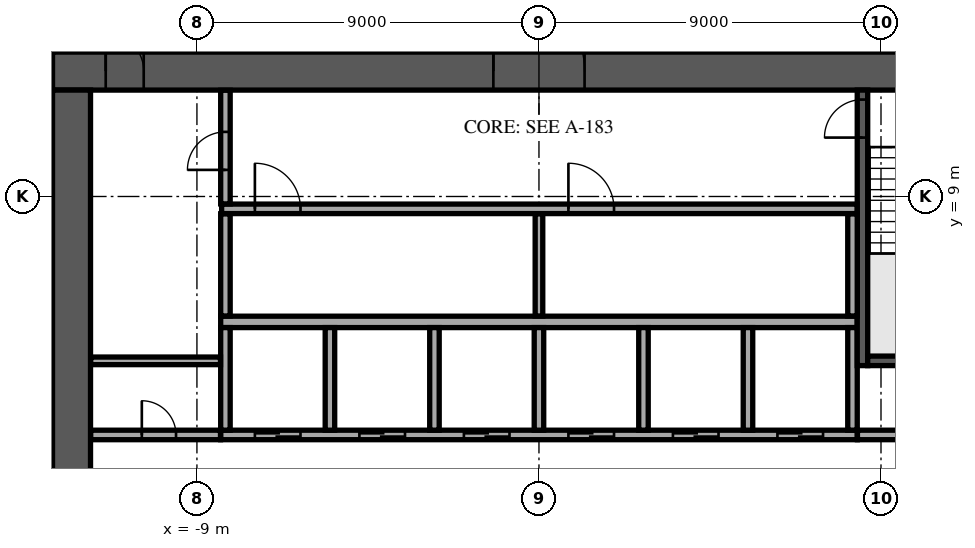
"""IFC4 building model, lengths in metres.
Left out: names, types, materials, properties, quantities, classifications, styles, units other than length and angle.
Written with IfcOpenShell. Run it as: python <this file> out.ifc"""

import sys

from ifc_helpers import new_model, si_unit, direction, frame, frame_2d, origin, place, context, subcontext, project, spatial, rectangle, extrude, element, fill, save


model = new_model("IFC4")
c1 = context("Model", 3, precision=1e-05, world=origin(), true_north=direction((0.0, 1.0)))
c2 = subcontext(c1, "Body", "Model", "MODEL_VIEW")
j1 = project(units=[si_unit("LENGTHUNIT", "METRE"), si_unit("PLANEANGLEUNIT", "RADIAN")], contexts=[c1])
p1 = place(None, origin())
s1 = spatial("IfcSite", under=j1, at=p1, CompositionType="ELEMENT")
p2 = place(p1, origin())
s2 = spatial("IfcBuilding", under=s1, at=p2, CompositionType="ELEMENT")
p3 = place(p2, frame((0.0, 0.0, 147.7)))
s3 = spatial("IfcBuildingStorey", under=s2, at=p3, CompositionType="ELEMENT", Elevation=147.7)
p4 = place(p3, frame((-12.8, 12.3, 0.0), z_axis=(0.0, 0.0, 1.0), x_axis=(1.0, 0.0, 0.0)))
e1 = element("IfcWall", 1, at=p4, inside=s3, PredefinedType="SHEAR", context=c2, shape_type="SweptSolid", body=[
    extrude(rectangle(XDim=25.6, YDim=1.0, at=frame_2d((12.8, 0.0))), origin(), (0.0, 0.0, 1.0), 3.6),
])
p5 = place(p4, frame((11.6, 0.0, 0.0)))
e2 = element("IfcOpeningElement", 2, at=p5, cuts=e1, PredefinedType="OPENING", context=c2, shape_type="SweptSolid", body=[
    extrude(rectangle(XDim=2.4, YDim=2.4, at=frame_2d((1.2, 1.2))), frame((0.0, 0.51, 0.0), z_axis=(0.0, -1.0, 0.0), x_axis=(1.0, 0.0, 0.0)), (0.0, 0.0, 1.0), 1.02),
])
p6 = place(p4, frame((22.425, 0.0, 0.0)))
e3 = element("IfcOpeningElement", 3, at=p6, cuts=e1, PredefinedType="OPENING", context=c2, shape_type="SweptSolid", body=[
    extrude(rectangle(XDim=1.2, YDim=2.1, at=frame_2d((0.6, 1.05))), frame((0.0, 0.51, 0.0), z_axis=(0.0, -1.0, 0.0), x_axis=(1.0, 0.0, 0.0)), (0.0, 0.0, 1.0), 1.02),
])
p7 = place(p4, frame((1.4, 0.0, 0.0)))
e4 = element("IfcOpeningElement", 4, at=p7, cuts=e1, PredefinedType="OPENING", context=c2, shape_type="SweptSolid", body=[
    extrude(rectangle(XDim=1.0, YDim=2.1, at=frame_2d((0.5, 1.05))), frame((0.0, 0.51, 0.0), z_axis=(0.0, -1.0, 0.0), x_axis=(1.0, 0.0, 0.0)), (0.0, 0.0, 1.0), 1.02),
])
p8 = place(p3, frame((-12.3, -11.8, 0.0), z_axis=(0.0, 0.0, 1.0), x_axis=(0.0, 1.0, 0.0)))
e5 = element("IfcWall", 5, at=p8, inside=s3, PredefinedType="SHEAR", context=c2, shape_type="SweptSolid", body=[
    extrude(rectangle(XDim=23.6, YDim=1.0, at=frame_2d((11.8, 0.0))), origin(), (0.0, 0.0, 1.0), 3.6),
])
p9 = place(p8, frame((10.6, 0.0, 0.0)))
e6 = element("IfcOpeningElement", 6, at=p9, cuts=e5, PredefinedType="OPENING", context=c2, shape_type="SweptSolid", body=[
    extrude(rectangle(XDim=2.4, YDim=2.4, at=frame_2d((1.2, 1.2))), frame((0.0, 0.51, 0.0), z_axis=(0.0, -1.0, 0.0), x_axis=(1.0, 0.0, 0.0)), (0.0, 0.0, 1.0), 1.02),
])
p10 = place(p3, frame((-8.375, 5.7, 0.0), z_axis=(0.0, 0.0, 1.0), x_axis=(1.0, 0.0, 0.0)))
e7 = element("IfcWall", 7, at=p10, inside=s3, PredefinedType="SOLIDWALL", context=c2, shape_type="SweptSolid", body=[
    extrude(rectangle(XDim=16.75, YDim=0.3, at=frame_2d((8.375, 0.0))), origin(), (0.0, 0.0, 1.0), 3.6),
])
p11 = place(p3, frame((-8.375, 2.725, 0.0), z_axis=(0.0, 0.0, 1.0), x_axis=(1.0, 0.0, 0.0)))
e8 = element("IfcWall", 8, at=p11, inside=s3, PredefinedType="SOLIDWALL", context=c2, shape_type="SweptSolid", body=[
    extrude(rectangle(XDim=16.75, YDim=0.25, at=frame_2d((8.375, 0.0))), origin(), (0.0, 0.0, 1.0), 3.6),
])
p12 = place(p11, frame((0.9, 0.0, 0.0)))
e9 = element("IfcOpeningElement", 9, at=p12, cuts=e8, PredefinedType="OPENING", context=c2, shape_type="SweptSolid", body=[
    extrude(rectangle(XDim=1.2, YDim=2.1, at=frame_2d((0.6, 1.05))), frame((0.0, 0.135, 0.0), z_axis=(0.0, -1.0, 0.0), x_axis=(1.0, 0.0, 0.0)), (0.0, 0.0, 1.0), 0.27),
])
p13 = place(p11, frame((3.65, 0.0, 0.0)))
e10 = element("IfcOpeningElement", 10, at=p13, cuts=e8, PredefinedType="OPENING", context=c2, shape_type="SweptSolid", body=[
    extrude(rectangle(XDim=1.2, YDim=2.1, at=frame_2d((0.6, 1.05))), frame((0.0, 0.135, 0.0), z_axis=(0.0, -1.0, 0.0), x_axis=(1.0, 0.0, 0.0)), (0.0, 0.0, 1.0), 0.27),
])
p14 = place(p11, frame((6.4, 0.0, 0.0)))
e11 = element("IfcOpeningElement", 11, at=p14, cuts=e8, PredefinedType="OPENING", context=c2, shape_type="SweptSolid", body=[
    extrude(rectangle(XDim=1.2, YDim=2.1, at=frame_2d((0.6, 1.05))), frame((0.0, 0.135, 0.0), z_axis=(0.0, -1.0, 0.0), x_axis=(1.0, 0.0, 0.0)), (0.0, 0.0, 1.0), 0.27),
])
p15 = place(p11, frame((9.15, 0.0, 0.0)))
e12 = element("IfcOpeningElement", 12, at=p15, cuts=e8, PredefinedType="OPENING", context=c2, shape_type="SweptSolid", body=[
    extrude(rectangle(XDim=1.2, YDim=2.1, at=frame_2d((0.6, 1.05))), frame((0.0, 0.135, 0.0), z_axis=(0.0, -1.0, 0.0), x_axis=(1.0, 0.0, 0.0)), (0.0, 0.0, 1.0), 0.27),
])
p16 = place(p11, frame((11.9, 0.0, 0.0)))
e13 = element("IfcOpeningElement", 13, at=p16, cuts=e8, PredefinedType="OPENING", context=c2, shape_type="SweptSolid", body=[
    extrude(rectangle(XDim=1.2, YDim=2.1, at=frame_2d((0.6, 1.05))), frame((0.0, 0.135, 0.0), z_axis=(0.0, -1.0, 0.0), x_axis=(1.0, 0.0, 0.0)), (0.0, 0.0, 1.0), 0.27),
])
p17 = place(p11, frame((14.65, 0.0, 0.0)))
e14 = element("IfcOpeningElement", 14, at=p17, cuts=e8, PredefinedType="OPENING", context=c2, shape_type="SweptSolid", body=[
    extrude(rectangle(XDim=1.2, YDim=2.1, at=frame_2d((0.6, 1.05))), frame((0.0, 0.135, 0.0), z_axis=(0.0, -1.0, 0.0), x_axis=(1.0, 0.0, 0.0)), (0.0, 0.0, 1.0), 0.27),
])
for number, where, z_axis, x_axis in (
    (15, (-8.25, 2.85, 0.0), (0.0, 0.0, 1.0), (0.0, 1.0, 0.0)),
    (16, (-5.5, 2.85, 0.0), (0.0, 0.0, 1.0), (0.0, 1.0, 0.0)),
    (17, (-2.75, 2.85, 0.0), (0.0, 0.0, 1.0), (0.0, 1.0, 0.0)),
    (18, (0.0, 2.85, 0.0), (0.0, 0.0, 1.0), (0.0, 1.0, 0.0)),
    (19, (2.75, 2.85, 0.0), (0.0, 0.0, 1.0), (0.0, 1.0, 0.0)),
    (20, (5.5, 2.85, 0.0), (0.0, 0.0, 1.0), (0.0, 1.0, 0.0)),
    (21, (8.25, 2.85, 0.0), (0.0, 0.0, 1.0), (0.0, 1.0, 0.0)),
):
    element("IfcWall", number, at=place(p3, frame(where, z_axis=z_axis, x_axis=x_axis)), inside=s3, PredefinedType="SOLIDWALL", context=c2, shape_type="SweptSolid", body=[
        extrude(rectangle(XDim=2.7, YDim=0.25, at=frame_2d((1.35, 0.0))), origin(), (0.0, 0.0, 1.0), 3.6),
    ])
p18 = place(p3, frame((8.512, 4.55, 0.0), z_axis=(0.0, 0.0, 1.0), x_axis=(0.0, 1.0, 0.0)))
e22 = element("IfcWall", 22, at=p18, inside=s3, PredefinedType="SOLIDWALL", context=c2, shape_type="SweptSolid", body=[
    extrude(rectangle(XDim=7.25, YDim=0.275, at=frame_2d((3.625, 0.0))), origin(), (0.0, 0.0, 1.0), 3.6),
])
p19 = place(p18, frame((6.0, 0.0, 0.0)))
e23 = element("IfcOpeningElement", 23, at=p19, cuts=e22, PredefinedType="OPENING", context=c2, shape_type="SweptSolid", body=[
    extrude(rectangle(XDim=1.0, YDim=2.1, at=frame_2d((0.5, 1.05))), frame((0.0, 0.147, 0.0), z_axis=(0.0, -1.0, 0.0), x_axis=(1.0, 0.0, 0.0)), (0.0, 0.0, 1.0), 0.295),
])
p20 = place(p3, frame((8.65, 4.675, 0.0), z_axis=(0.0, 0.0, 1.0), x_axis=(1.0, 0.0, 0.0)))
e24 = element("IfcWall", 24, at=p20, inside=s3, PredefinedType="SOLIDWALL", context=c2, shape_type="SweptSolid", body=[
    extrude(rectangle(XDim=3.15, YDim=0.25, at=frame_2d((1.575, 0.0))), origin(), (0.0, 0.0, 1.0), 3.6),
])
p21 = place(p3, frame((-11.795, 2.725, 0.0), z_axis=(0.0, 0.0, 1.0), x_axis=(1.0, 0.0, 0.0)))
e25 = element("IfcWall", 25, at=p21, inside=s3, PredefinedType="PARTITIONING", context=c2, shape_type="SweptSolid", body=[
    extrude(rectangle(XDim=3.415, YDim=0.25, at=frame_2d((1.708, 0.0))), origin(), (0.0, 0.0, 1.0), 3.6),
])
p22 = place(p21, frame((1.345, 0.0, 0.0)))
e26 = element("IfcOpeningElement", 26, at=p22, cuts=e25, PredefinedType="OPENING", context=c2, shape_type="SweptSolid", body=[
    extrude(rectangle(XDim=0.9, YDim=2.1, at=frame_2d((0.45, 1.05))), frame((0.0, 0.135, 0.0), z_axis=(0.0, -1.0, 0.0), x_axis=(1.0, 0.0, 0.0)), (0.0, 0.0, 1.0), 0.27),
])
p23 = place(p3, frame((8.38, 2.725, 0.0), z_axis=(0.0, 0.0, 1.0), x_axis=(1.0, 0.0, 0.0)))
e27 = element("IfcWall", 27, at=p23, inside=s3, PredefinedType="PARTITIONING", context=c2, shape_type="SweptSolid", body=[
    extrude(rectangle(XDim=3.415, YDim=0.25, at=frame_2d((1.708, 0.0))), origin(), (0.0, 0.0, 1.0), 3.6),
])
p24 = place(p23, frame((1.17, 0.0, 0.0)))
e28 = element("IfcOpeningElement", 28, at=p24, cuts=e27, PredefinedType="OPENING", context=c2, shape_type="SweptSolid", body=[
    extrude(rectangle(XDim=0.9, YDim=2.1, at=frame_2d((0.45, 1.05))), frame((0.0, 0.135, 0.0), z_axis=(0.0, -1.0, 0.0), x_axis=(1.0, 0.0, 0.0)), (0.0, 0.0, 1.0), 0.27),
])
p25 = place(p3, frame((-11.795, 4.675, 0.0), z_axis=(0.0, 0.0, 1.0), x_axis=(1.0, 0.0, 0.0)))
e29 = element("IfcWall", 29, at=p25, inside=s3, PredefinedType="PARTITIONING", context=c2, shape_type="SweptSolid", body=[
    extrude(rectangle(XDim=3.415, YDim=0.2, at=frame_2d((1.708, 0.0))), origin(), (0.0, 0.0, 1.0), 3.6),
])
p26 = place(p3, frame((-8.25, 5.855, 0.0), z_axis=(0.0, 0.0, 1.0), x_axis=(0.0, 1.0, 0.0)))
e30 = element("IfcWall", 30, at=p26, inside=s3, PredefinedType="PARTITIONING", context=c2, shape_type="SweptSolid", body=[
    extrude(rectangle(XDim=2.69, YDim=0.25, at=frame_2d((1.345, 0.0))), origin(), (0.0, 0.0, 1.0), 3.6),
])
p27 = place(p3, frame((0.0, 5.855, 0.0), z_axis=(0.0, 0.0, 1.0), x_axis=(0.0, 1.0, 0.0)))
e31 = element("IfcWall", 31, at=p27, inside=s3, PredefinedType="PARTITIONING", context=c2, shape_type="SweptSolid", body=[
    extrude(rectangle(XDim=2.69, YDim=0.2, at=frame_2d((1.345, 0.0))), origin(), (0.0, 0.0, 1.0), 3.6),
])
p28 = place(p3, frame((8.25, 5.855, 0.0), z_axis=(0.0, 0.0, 1.0), x_axis=(0.0, 1.0, 0.0)))
e32 = element("IfcWall", 32, at=p28, inside=s3, PredefinedType="PARTITIONING", context=c2, shape_type="SweptSolid", body=[
    extrude(rectangle(XDim=2.69, YDim=0.25, at=frame_2d((1.345, 0.0))), origin(), (0.0, 0.0, 1.0), 3.6),
])
p29 = place(p3, frame((-8.35, 8.675, 0.0), z_axis=(0.0, 0.0, 1.0), x_axis=(1.0, 0.0, 0.0)))
e33 = element("IfcWall", 33, at=p29, inside=s3, PredefinedType="PARTITIONING", context=c2, shape_type="SweptSolid", body=[
    extrude(rectangle(XDim=16.72, YDim=0.25, at=frame_2d((8.36, 0.0))), origin(), (0.0, 0.0, 1.0), 3.6),
])
p30 = place(p29, frame((0.875, 0.0, 0.0)))
e34 = element("IfcOpeningElement", 34, at=p30, cuts=e33, PredefinedType="OPENING", context=c2, shape_type="SweptSolid", body=[
    extrude(rectangle(XDim=1.2, YDim=2.1, at=frame_2d((0.6, 1.05))), frame((0.0, 0.135, 0.0), z_axis=(0.0, -1.0, 0.0), x_axis=(1.0, 0.0, 0.0)), (0.0, 0.0, 1.0), 0.27),
])
p31 = place(p29, frame((9.125, 0.0, 0.0)))
e35 = element("IfcOpeningElement", 35, at=p31, cuts=e33, PredefinedType="OPENING", context=c2, shape_type="SweptSolid", body=[
    extrude(rectangle(XDim=1.2, YDim=2.1, at=frame_2d((0.6, 1.05))), frame((0.0, 0.135, 0.0), z_axis=(0.0, -1.0, 0.0), x_axis=(1.0, 0.0, 0.0)), (0.0, 0.0, 1.0), 0.27),
])
p32 = place(p3, frame((-8.25, 8.805, 0.0), z_axis=(0.0, 0.0, 1.0), x_axis=(0.0, 1.0, 0.0)))
e36 = element("IfcWall", 36, at=p32, inside=s3, PredefinedType="PARTITIONING", context=c2, shape_type="SweptSolid", body=[
    extrude(rectangle(XDim=2.99, YDim=0.25, at=frame_2d((1.495, 0.0))), origin(), (0.0, 0.0, 1.0), 3.6),
])
p33 = place(p32, frame((0.895, 0.0, 0.0)))
e37 = element("IfcOpeningElement", 37, at=p33, cuts=e36, PredefinedType="OPENING", context=c2, shape_type="SweptSolid", body=[
    extrude(rectangle(XDim=1.0, YDim=2.1, at=frame_2d((0.5, 1.05))), frame((0.0, 0.135, 0.0), z_axis=(0.0, -1.0, 0.0), x_axis=(1.0, 0.0, 0.0)), (0.0, 0.0, 1.0), 0.27),
])
p34 = place(p3, frame((7.558, 34.99, 0.0), z_axis=(0.0, 0.0, 1.0), x_axis=(-0.857166849875, -0.515038825212, 0.0)))
e38 = element("IfcWall", 38, at=p34, inside=s3, PredefinedType="STANDARD", context=c2, shape_type="SweptSolid", body=[
    extrude(rectangle(XDim=49.376, YDim=0.6, at=frame_2d((24.688, 0.0))), origin(), (0.0, 0.0, 1.0), 3.6),
])
p35 = place(p34, frame((1.2, 0.0, 0.9)))
e39 = element("IfcOpeningElement", 39, at=p35, cuts=e38, PredefinedType="OPENING", context=c2, shape_type="SweptSolid", body=[
    extrude(rectangle(XDim=2.1, YDim=2.1, at=frame_2d((1.05, 1.05))), frame((0.0, 0.31, 0.0), z_axis=(0.0, -1.0, 0.0), x_axis=(1.0, 0.0, 0.0)), (0.0, 0.0, 1.0), 0.62),
])
p36 = place(p34, frame((5.7, 0.0, 0.9)))
e40 = element("IfcOpeningElement", 40, at=p36, cuts=e38, PredefinedType="OPENING", context=c2, shape_type="SweptSolid", body=[
    extrude(rectangle(XDim=2.1, YDim=2.1, at=frame_2d((1.05, 1.05))), frame((0.0, 0.31, 0.0), z_axis=(0.0, -1.0, 0.0), x_axis=(1.0, 0.0, 0.0)), (0.0, 0.0, 1.0), 0.62),
])
p37 = place(p34, frame((10.2, 0.0, 0.9)))
e41 = element("IfcOpeningElement", 41, at=p37, cuts=e38, PredefinedType="OPENING", context=c2, shape_type="SweptSolid", body=[
    extrude(rectangle(XDim=2.1, YDim=2.1, at=frame_2d((1.05, 1.05))), frame((0.0, 0.31, 0.0), z_axis=(0.0, -1.0, 0.0), x_axis=(1.0, 0.0, 0.0)), (0.0, 0.0, 1.0), 0.62),
])
p38 = place(p34, frame((14.7, 0.0, 0.9)))
e42 = element("IfcOpeningElement", 42, at=p38, cuts=e38, PredefinedType="OPENING", context=c2, shape_type="SweptSolid", body=[
    extrude(rectangle(XDim=2.1, YDim=2.1, at=frame_2d((1.05, 1.05))), frame((0.0, 0.31, 0.0), z_axis=(0.0, -1.0, 0.0), x_axis=(1.0, 0.0, 0.0)), (0.0, 0.0, 1.0), 0.62),
])
p39 = place(p34, frame((19.2, 0.0, 0.9)))
e43 = element("IfcOpeningElement", 43, at=p39, cuts=e38, PredefinedType="OPENING", context=c2, shape_type="SweptSolid", body=[
    extrude(rectangle(XDim=2.1, YDim=2.1, at=frame_2d((1.05, 1.05))), frame((0.0, 0.31, 0.0), z_axis=(0.0, -1.0, 0.0), x_axis=(1.0, 0.0, 0.0)), (0.0, 0.0, 1.0), 0.62),
])
p40 = place(p34, frame((23.7, 0.0, 0.9)))
e44 = element("IfcOpeningElement", 44, at=p40, cuts=e38, PredefinedType="OPENING", context=c2, shape_type="SweptSolid", body=[
    extrude(rectangle(XDim=2.1, YDim=2.1, at=frame_2d((1.05, 1.05))), frame((0.0, 0.31, 0.0), z_axis=(0.0, -1.0, 0.0), x_axis=(1.0, 0.0, 0.0)), (0.0, 0.0, 1.0), 0.62),
])
p41 = place(p34, frame((28.2, 0.0, 0.9)))
e45 = element("IfcOpeningElement", 45, at=p41, cuts=e38, PredefinedType="OPENING", context=c2, shape_type="SweptSolid", body=[
    extrude(rectangle(XDim=2.1, YDim=2.1, at=frame_2d((1.05, 1.05))), frame((0.0, 0.31, 0.0), z_axis=(0.0, -1.0, 0.0), x_axis=(1.0, 0.0, 0.0)), (0.0, 0.0, 1.0), 0.62),
])
p42 = place(p34, frame((32.7, 0.0, 0.9)))
e46 = element("IfcOpeningElement", 46, at=p42, cuts=e38, PredefinedType="OPENING", context=c2, shape_type="SweptSolid", body=[
    extrude(rectangle(XDim=2.1, YDim=2.1, at=frame_2d((1.05, 1.05))), frame((0.0, 0.31, 0.0), z_axis=(0.0, -1.0, 0.0), x_axis=(1.0, 0.0, 0.0)), (0.0, 0.0, 1.0), 0.62),
])
p43 = place(p34, frame((37.2, 0.0, 0.9)))
e47 = element("IfcOpeningElement", 47, at=p43, cuts=e38, PredefinedType="OPENING", context=c2, shape_type="SweptSolid", body=[
    extrude(rectangle(XDim=2.1, YDim=2.1, at=frame_2d((1.05, 1.05))), frame((0.0, 0.31, 0.0), z_axis=(0.0, -1.0, 0.0), x_axis=(1.0, 0.0, 0.0)), (0.0, 0.0, 1.0), 0.62),
])
p44 = place(p34, frame((41.7, 0.0, 0.9)))
e48 = element("IfcOpeningElement", 48, at=p44, cuts=e38, PredefinedType="OPENING", context=c2, shape_type="SweptSolid", body=[
    extrude(rectangle(XDim=2.1, YDim=2.1, at=frame_2d((1.05, 1.05))), frame((0.0, 0.31, 0.0), z_axis=(0.0, -1.0, 0.0), x_axis=(1.0, 0.0, 0.0)), (0.0, 0.0, 1.0), 0.62),
])
p45 = place(p34, frame((46.138, 0.0, 0.9)))
e49 = element("IfcOpeningElement", 49, at=p45, cuts=e38, PredefinedType="OPENING", context=c2, shape_type="SweptSolid", body=[
    extrude(rectangle(XDim=2.1, YDim=2.1, at=frame_2d((1.05, 1.05))), frame((0.0, 0.31, 0.0), z_axis=(0.0, -1.0, 0.0), x_axis=(1.0, 0.0, 0.0)), (0.0, 0.0, 1.0), 0.62),
])
p46 = place(p3, frame((-23.876, 7.707, 0.0), z_axis=(0.0, 0.0, 1.0), x_axis=(0.857167605318, 0.515037567943, 0.0)))
e50 = element("IfcWall", 50, at=p46, inside=s3, PredefinedType="PARTITIONING", context=c2, shape_type="SweptSolid", body=[
    extrude(rectangle(XDim=32.994, YDim=0.15, at=frame_2d((16.497, 0.0))), origin(), (0.0, 0.0, 1.0), 3.15),
])
p47 = place(p46, frame((1.8, 0.0, 0.0)))
e51 = element("IfcOpeningElement", 51, at=p47, cuts=e50, PredefinedType="OPENING", context=c2, shape_type="SweptSolid", body=[
    extrude(rectangle(XDim=1.8, YDim=2.1, at=frame_2d((0.9, 1.05))), frame((0.0, 0.085, 0.0), z_axis=(0.0, -1.0, 0.0), x_axis=(1.0, 0.0, 0.0)), (0.0, 0.0, 1.0), 0.17),
])
p48 = place(p46, frame((10.3, 0.0, 0.0)))
e52 = element("IfcOpeningElement", 52, at=p48, cuts=e50, PredefinedType="OPENING", context=c2, shape_type="SweptSolid", body=[
    extrude(rectangle(XDim=1.0, YDim=2.1, at=frame_2d((0.5, 1.05))), frame((0.0, 0.085, 0.0), z_axis=(0.0, -1.0, 0.0), x_axis=(1.0, 0.0, 0.0)), (0.0, 0.0, 1.0), 0.17),
])
p49 = place(p46, frame((14.059, 0.0, 0.0)))
e53 = element("IfcOpeningElement", 53, at=p49, cuts=e50, PredefinedType="OPENING", context=c2, shape_type="SweptSolid", body=[
    extrude(rectangle(XDim=1.0, YDim=2.1, at=frame_2d((0.5, 1.05))), frame((0.0, 0.085, 0.0), z_axis=(0.0, -1.0, 0.0), x_axis=(1.0, 0.0, 0.0)), (0.0, 0.0, 1.0), 0.17),
])
p50 = place(p46, frame((20.458, 0.0, 0.0)))
e54 = element("IfcOpeningElement", 54, at=p50, cuts=e50, PredefinedType="OPENING", context=c2, shape_type="SweptSolid", body=[
    extrude(rectangle(XDim=1.0, YDim=2.1, at=frame_2d((0.5, 1.05))), frame((0.0, 0.085, 0.0), z_axis=(0.0, -1.0, 0.0), x_axis=(1.0, 0.0, 0.0)), (0.0, 0.0, 1.0), 0.17),
])
p51 = place(p5, origin())
e55 = element("IfcDoor", 55, at=p51, inside=s3, OperationType="SINGLE_SWING_LEFT", PredefinedType="DOOR", context=c2, shape_type="SweptSolid", body=[
    extrude(rectangle(XDim=2.4, YDim=2.4, at=frame_2d((1.2, 1.2))), frame((0.0, 0.025, 0.0), z_axis=(0.0, -1.0, 0.0), x_axis=(1.0, 0.0, 0.0)), (0.0, 0.0, 1.0), 0.05),
])
fill(e2, e55)
p52 = place(p7, origin())
e56 = element("IfcDoor", 56, at=p52, inside=s3, OperationType="SINGLE_SWING_LEFT", PredefinedType="DOOR", context=c2, shape_type="SweptSolid", body=[
    extrude(rectangle(XDim=1.0, YDim=2.1, at=frame_2d((0.5, 1.05))), frame((0.0, 0.025, 0.0), z_axis=(0.0, -1.0, 0.0), x_axis=(1.0, 0.0, 0.0)), (0.0, 0.0, 1.0), 0.05),
])
fill(e4, e56)
p53 = place(p12, origin())
e57 = element("IfcDoor", 57, at=p53, inside=s3, OperationType="DOUBLE_DOOR_SLIDING", PredefinedType="DOOR", context=c2, shape_type="SweptSolid", body=[
    extrude(rectangle(XDim=1.2, YDim=2.1, at=frame_2d((0.6, 1.05))), frame((0.0, 0.025, 0.0), z_axis=(0.0, -1.0, 0.0), x_axis=(1.0, 0.0, 0.0)), (0.0, 0.0, 1.0), 0.05),
])
fill(e9, e57)
p54 = place(p13, origin())
e58 = element("IfcDoor", 58, at=p54, inside=s3, OperationType="DOUBLE_DOOR_SLIDING", PredefinedType="DOOR", context=c2, shape_type="SweptSolid", body=[
    extrude(rectangle(XDim=1.2, YDim=2.1, at=frame_2d((0.6, 1.05))), frame((0.0, 0.025, 0.0), z_axis=(0.0, -1.0, 0.0), x_axis=(1.0, 0.0, 0.0)), (0.0, 0.0, 1.0), 0.05),
])
fill(e10, e58)
p55 = place(p14, origin())
e59 = element("IfcDoor", 59, at=p55, inside=s3, OperationType="DOUBLE_DOOR_SLIDING", PredefinedType="DOOR", context=c2, shape_type="SweptSolid", body=[
    extrude(rectangle(XDim=1.2, YDim=2.1, at=frame_2d((0.6, 1.05))), frame((0.0, 0.025, 0.0), z_axis=(0.0, -1.0, 0.0), x_axis=(1.0, 0.0, 0.0)), (0.0, 0.0, 1.0), 0.05),
])
fill(e11, e59)
p56 = place(p15, origin())
e60 = element("IfcDoor", 60, at=p56, inside=s3, OperationType="DOUBLE_DOOR_SLIDING", PredefinedType="DOOR", context=c2, shape_type="SweptSolid", body=[
    extrude(rectangle(XDim=1.2, YDim=2.1, at=frame_2d((0.6, 1.05))), frame((0.0, 0.025, 0.0), z_axis=(0.0, -1.0, 0.0), x_axis=(1.0, 0.0, 0.0)), (0.0, 0.0, 1.0), 0.05),
])
fill(e12, e60)
p57 = place(p16, origin())
e61 = element("IfcDoor", 61, at=p57, inside=s3, OperationType="DOUBLE_DOOR_SLIDING", PredefinedType="DOOR", context=c2, shape_type="SweptSolid", body=[
    extrude(rectangle(XDim=1.2, YDim=2.1, at=frame_2d((0.6, 1.05))), frame((0.0, 0.025, 0.0), z_axis=(0.0, -1.0, 0.0), x_axis=(1.0, 0.0, 0.0)), (0.0, 0.0, 1.0), 0.05),
])
fill(e13, e61)
p58 = place(p17, origin())
e62 = element("IfcDoor", 62, at=p58, inside=s3, OperationType="DOUBLE_DOOR_SLIDING", PredefinedType="DOOR", context=c2, shape_type="SweptSolid", body=[
    extrude(rectangle(XDim=1.2, YDim=2.1, at=frame_2d((0.6, 1.05))), frame((0.0, 0.025, 0.0), z_axis=(0.0, -1.0, 0.0), x_axis=(1.0, 0.0, 0.0)), (0.0, 0.0, 1.0), 0.05),
])
fill(e14, e62)
p59 = place(p19, origin())
e63 = element("IfcDoor", 63, at=p59, inside=s3, OperationType="SINGLE_SWING_LEFT", PredefinedType="DOOR", context=c2, shape_type="SweptSolid", body=[
    extrude(rectangle(XDim=1.0, YDim=2.1, at=frame_2d((0.5, 1.05))), frame((0.0, 0.025, 0.0), z_axis=(0.0, -1.0, 0.0), x_axis=(1.0, 0.0, 0.0)), (0.0, 0.0, 1.0), 0.05),
])
fill(e23, e63)
p60 = place(p22, origin())
e64 = element("IfcDoor", 64, at=p60, inside=s3, OperationType="SINGLE_SWING_LEFT", PredefinedType="DOOR", context=c2, shape_type="SweptSolid", body=[
    extrude(rectangle(XDim=0.9, YDim=2.1, at=frame_2d((0.45, 1.05))), frame((0.0, 0.025, 0.0), z_axis=(0.0, -1.0, 0.0), x_axis=(1.0, 0.0, 0.0)), (0.0, 0.0, 1.0), 0.05),
])
fill(e26, e64)
p61 = place(p33, origin())
e65 = element("IfcDoor", 65, at=p61, inside=s3, OperationType="SINGLE_SWING_LEFT", PredefinedType="DOOR", context=c2, shape_type="SweptSolid", body=[
    extrude(rectangle(XDim=1.0, YDim=2.1, at=frame_2d((0.5, 1.05))), frame((0.0, 0.025, 0.0), z_axis=(0.0, -1.0, 0.0), x_axis=(1.0, 0.0, 0.0)), (0.0, 0.0, 1.0), 0.05),
])
fill(e37, e65)
p62 = place(p30, origin())
e66 = element("IfcDoor", 66, at=p62, inside=s3, OperationType="SINGLE_SWING_LEFT", PredefinedType="DOOR", context=c2, shape_type="SweptSolid", body=[
    extrude(rectangle(XDim=1.2, YDim=2.1, at=frame_2d((0.6, 1.05))), frame((0.0, 0.025, 0.0), z_axis=(0.0, -1.0, 0.0), x_axis=(1.0, 0.0, 0.0)), (0.0, 0.0, 1.0), 0.05),
])
fill(e34, e66)
p63 = place(p31, origin())
e67 = element("IfcDoor", 67, at=p63, inside=s3, OperationType="SINGLE_SWING_LEFT", PredefinedType="DOOR", context=c2, shape_type="SweptSolid", body=[
    extrude(rectangle(XDim=1.2, YDim=2.1, at=frame_2d((0.6, 1.05))), frame((0.0, 0.025, 0.0), z_axis=(0.0, -1.0, 0.0), x_axis=(1.0, 0.0, 0.0)), (0.0, 0.0, 1.0), 0.05),
])
fill(e35, e67)
save(model, sys.argv[1])
